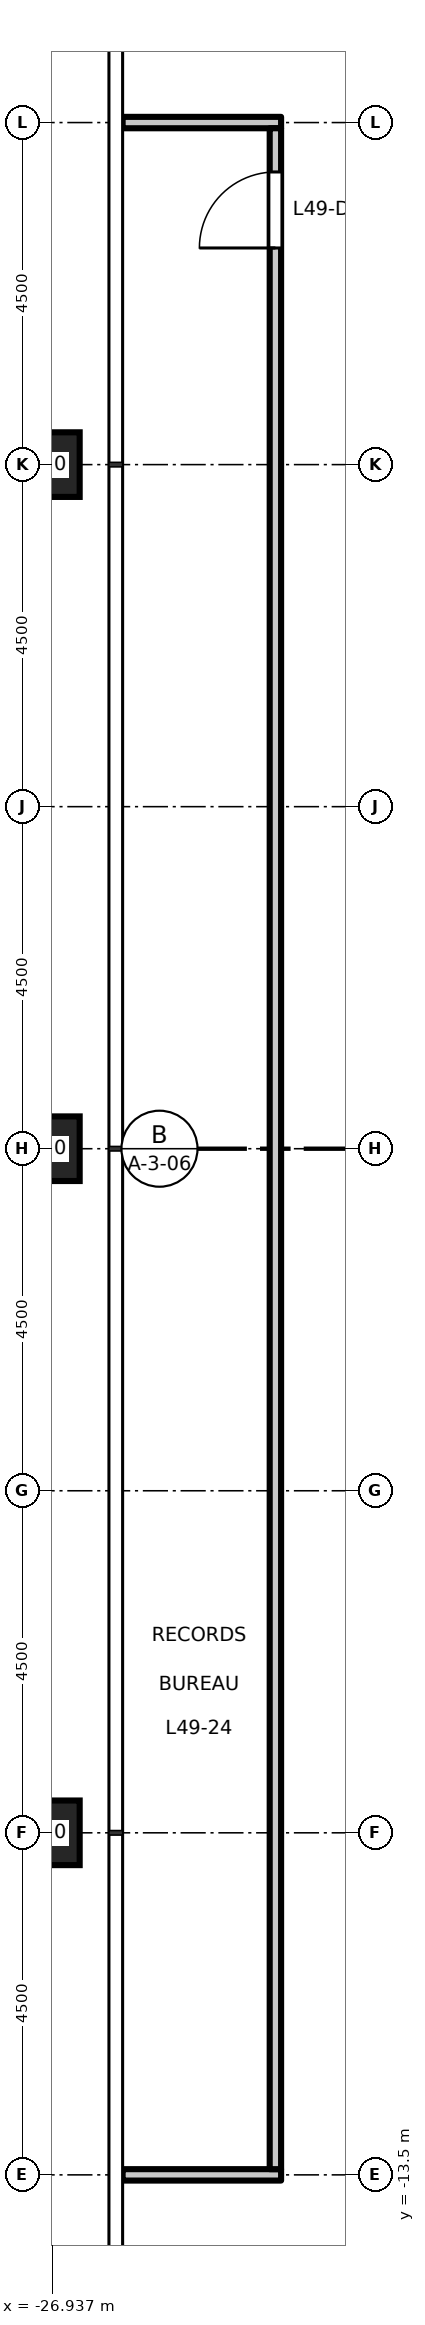
"""IFC4 building model, lengths in metres.
Left out: names, types, materials, properties, quantities, classifications, styles, units other than length and angle.
Written with IfcOpenShell. Run it as: python <this file> out.ifc"""

import sys

from ifc_helpers import new_model, si_unit, direction, frame, frame_2d, origin, origin_2d, place, context, subcontext, project, spatial, rectangle, hollow_rectangle, extrude, element, fill, save


model = new_model("IFC4")
c1 = context("Model", 3, precision=1e-05, world=origin(), true_north=direction((0.0, 1.0)))
c2 = subcontext(c1, "Body", "Model", "MODEL_VIEW")
j1 = project(units=[si_unit("LENGTHUNIT", "METRE"), si_unit("PLANEANGLEUNIT", "RADIAN")], contexts=[c1])
p1 = place(None, origin())
s1 = spatial("IfcSite", under=j1, at=p1, CompositionType="ELEMENT")
p2 = place(p1, origin())
s2 = spatial("IfcBuilding", under=s1, at=p2, CompositionType="ELEMENT")
p3 = place(p2, frame((0.0, 0.0, 228.7)))
s3 = spatial("IfcBuildingStorey", under=s2, at=p3, CompositionType="ELEMENT", Elevation=228.7)
for number, where, z_axis, x_axis in (
    (1, (-27.0, 9.0, 0.0), (0.0, 0.0, 1.0), (1.0, 0.0, 0.0)),
    (2, (-27.0, 0.0, 0.0), (0.0, 0.0, 1.0), (1.0, 0.0, 0.0)),
    (3, (-27.0, -9.0, 0.0), (0.0, 0.0, 1.0), (1.0, 0.0, 0.0)),
):
    element("IfcColumn", number, at=place(p3, frame(where, z_axis=z_axis, x_axis=x_axis)), inside=s3, PredefinedType="COLUMN", context=c2, shape_type="SweptSolid", body=[
        extrude(hollow_rectangle(XDim=0.85, YDim=0.85, WallThickness=0.05, at=origin_2d()), origin(), (0.0, 0.0, 1.0), 4.5),
    ])
p4 = place(p3, frame((-26.01, -13.5, 0.0), z_axis=(0.0, 0.0, 1.0), x_axis=(1.0, 0.0, 0.0)))
e4 = element("IfcWall", 4, at=p4, inside=s3, PredefinedType="PARTITIONING", context=c2, shape_type="SweptSolid", body=[
    extrude(rectangle(XDim=2.085, YDim=0.15, at=frame_2d((1.042, 0.0))), origin(), (0.0, 0.0, 1.0), 3.95),
])
p5 = place(p3, frame((-26.01, 13.5, 0.0), z_axis=(0.0, 0.0, 1.0), x_axis=(1.0, 0.0, 0.0)))
e5 = element("IfcWall", 5, at=p5, inside=s3, PredefinedType="PARTITIONING", context=c2, shape_type="SweptSolid", body=[
    extrude(rectangle(XDim=2.085, YDim=0.15, at=frame_2d((1.042, 0.0))), origin(), (0.0, 0.0, 1.0), 4.35),
])
p6 = place(p3, frame((-24.0, -13.425, 0.0), z_axis=(0.0, 0.0, 1.0), x_axis=(0.0, 1.0, 0.0)))
e6 = element("IfcWall", 6, at=p6, inside=s3, PredefinedType="PARTITIONING", context=c2, shape_type="SweptSolid", body=[
    extrude(rectangle(XDim=26.85, YDim=0.15, at=frame_2d((13.425, 0.0))), origin(), (0.0, 0.0, 1.0), 4.35),
])
p7 = place(p6, frame((25.275, 0.0, 0.0)))
e7 = element("IfcOpeningElement", 7, at=p7, cuts=e6, PredefinedType="OPENING", context=c2, shape_type="SweptSolid", body=[
    extrude(rectangle(XDim=1.0, YDim=2.1, at=frame_2d((0.5, 1.05))), frame((0.0, 0.085, 0.0), z_axis=(0.0, -1.0, 0.0), x_axis=(1.0, 0.0, 0.0)), (0.0, 0.0, 1.0), 0.17),
])
p8 = place(p7, origin())
e8 = element("IfcDoor", 8, at=p8, inside=s3, OperationType="SINGLE_SWING_LEFT", PredefinedType="DOOR", context=c2, shape_type="SweptSolid", body=[
    extrude(rectangle(XDim=1.0, YDim=2.1, at=frame_2d((0.5, 1.05))), frame((0.0, 0.025, 0.0), z_axis=(0.0, -1.0, 0.0), x_axis=(1.0, 0.0, 0.0)), (0.0, 0.0, 1.0), 0.05),
])
fill(e7, e8)
save(model, sys.argv[1])
